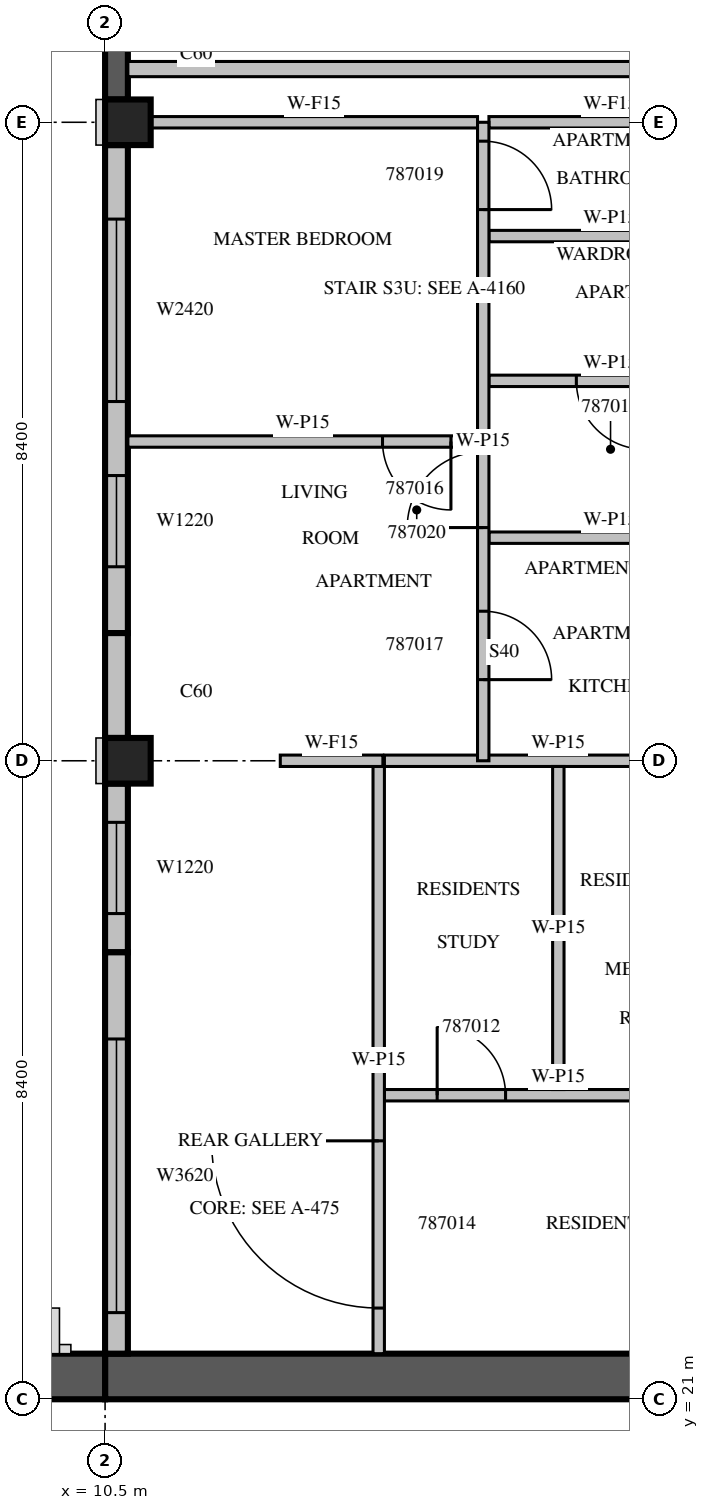
"""IFC4 building model, lengths in metres.
Left out: names, types, materials, properties, quantities, classifications, styles, units other than length and angle.
Written with IfcOpenShell. Run it as: python <this file> out.ifc"""

import sys

from ifc_helpers import new_model, si_unit, direction, frame, frame_2d, origin, origin_2d, place, context, subcontext, project, spatial, rectangle, extrude, source, transform, mapped, element, fill, save


model = new_model("IFC4")
c1 = context("Model", 3, precision=1e-05, world=origin(), true_north=direction((0.0, 1.0)))
c2 = subcontext(c1, "Body", "Model", "MODEL_VIEW")
j1 = project(units=[si_unit("LENGTHUNIT", "METRE"), si_unit("PLANEANGLEUNIT", "RADIAN")], contexts=[c1])
p1 = place(None, origin())
s1 = spatial("IfcSite", under=j1, at=p1, CompositionType="ELEMENT")
p2 = place(p1, origin())
s2 = spatial("IfcBuilding", under=s1, at=p2, CompositionType="ELEMENT")
p3 = place(p2, frame((0.0, 0.0, 365.0)))
s3 = spatial("IfcBuildingStorey", under=s2, at=p3, CompositionType="ELEMENT", Elevation=365.0)
m1 = source(origin(), c2, "Body", "SweptSolid", [
    extrude(rectangle(XDim=0.6, YDim=0.6, at=origin_2d()), origin(), (0.0, 0.0, 1.0), 3.5),
])
for number, where, z_axis, x_axis in (
    (1, (10.8, 29.4, 0.0), (0.0, 0.0, 1.0), (1.0, 0.0, 0.0)),
    (2, (10.8, 37.8, 0.0), (0.0, 0.0, 1.0), (1.0, 0.0, 0.0)),
):
    element("IfcColumn", number, at=place(p3, frame(where, z_axis=z_axis, x_axis=x_axis)), inside=s3, PredefinedType="COLUMN", context=c2, shape_type="MappedRepresentation", body=[
        mapped(m1, transform((0.0, 0.0, 0.0), scale=1.0)),
    ])
m2 = source(origin(), c2, "Body", "SweptSolid", [
    extrude(rectangle(XDim=11.1, YDim=0.6, at=frame_2d((5.55, 0.0))), origin(), (0.0, 0.0, 1.0), 3.5),
])
p4 = place(p3, frame((10.5, 21.3, 0.0), z_axis=(0.0, 0.0, 1.0), x_axis=(1.0, 0.0, 0.0)))
e3 = element("IfcWall", 3, at=p4, inside=s3, PredefinedType="SHEAR", context=c2, shape_type="MappedRepresentation", body=[
    mapped(m2, transform((0.0, 0.0, 0.0), scale=1.0)),
])
m3 = source(origin(), c2, "Body", "SweptSolid", [
    extrude(rectangle(XDim=1.2, YDim=2.1, at=frame_2d((0.6, 1.05))), frame((0.0, 0.31, 0.0), z_axis=(0.0, -1.0, 0.0), x_axis=(1.0, 0.0, 0.0)), (0.0, 0.0, 1.0), 0.62),
])
p5 = place(p4, frame((8.7, 0.0, 0.0)))
e4 = element("IfcOpeningElement", 4, at=p5, cuts=e3, PredefinedType="OPENING", context=c2, shape_type="MappedRepresentation", body=[
    mapped(m3, transform((0.0, 0.0, 0.0), scale=1.0)),
])
m4 = source(origin(), c2, "Body", "SweptSolid", [
    extrude(rectangle(XDim=6.6, YDim=0.6, at=frame_2d((3.3, 0.0))), origin(), (0.0, 0.0, 1.0), 3.5),
])
p6 = place(p3, frame((3.9, 21.3, 0.0), z_axis=(0.0, 0.0, 1.0), x_axis=(1.0, 0.0, 0.0)))
e5 = element("IfcWall", 5, at=p6, inside=s3, PredefinedType="SHEAR", context=c2, shape_type="MappedRepresentation", body=[
    mapped(m4, transform((0.0, 0.0, 0.0), scale=1.0)),
])
m5 = source(origin(), c2, "Body", "SweptSolid", [
    extrude(rectangle(XDim=1.2, YDim=2.4, at=frame_2d((0.6, 1.2))), frame((0.0, 0.31, 0.0), z_axis=(0.0, -1.0, 0.0), x_axis=(1.0, 0.0, 0.0)), (0.0, 0.0, 1.0), 0.62),
])
p7 = place(p6, frame((1.5, 0.0, 0.6)))
e6 = element("IfcOpeningElement", 6, at=p7, cuts=e5, PredefinedType="OPENING", context=c2, shape_type="MappedRepresentation", body=[
    mapped(m5, transform((0.0, 0.0, 0.0), scale=1.0)),
])
p8 = place(p6, frame((3.6, 0.0, 0.6)))
e7 = element("IfcOpeningElement", 7, at=p8, cuts=e5, PredefinedType="OPENING", context=c2, shape_type="MappedRepresentation", body=[
    mapped(m5, transform((0.0, 0.0, 0.0), scale=1.0)),
])
p9 = place(p3, frame((10.65, 43.68, 0.0), z_axis=(0.0, 0.0, 1.0), x_axis=(0.0, -1.0, 0.0)))
e8 = element("IfcWall", 8, at=p9, inside=s3, PredefinedType="SOLIDWALL", context=c2, shape_type="SweptSolid", body=[
    extrude(rectangle(XDim=5.58, YDim=0.3, at=frame_2d((2.79, 0.0))), origin(), (0.0, 0.0, 1.0), 3.05),
])
p10 = place(p3, frame((10.65, 37.5, 0.0), z_axis=(0.0, 0.0, 1.0), x_axis=(0.0, -1.0, 0.0)))
e9 = element("IfcWall", 9, at=p10, inside=s3, PredefinedType="STANDARD", context=c2, shape_type="SweptSolid", body=[
    extrude(rectangle(XDim=6.42, YDim=0.3, at=frame_2d((3.21, 0.0))), origin(), (0.0, 0.0, 1.0), 3.05),
])
m6 = source(origin(), c2, "Body", "SweptSolid", [
    extrude(rectangle(XDim=1.2, YDim=2.0, at=frame_2d((0.6, 1.0))), frame((0.0, 0.16, 0.0), z_axis=(0.0, -1.0, 0.0), x_axis=(1.0, 0.0, 0.0)), (0.0, 0.0, 1.0), 0.32),
])
p11 = place(p10, frame((4.348, 0.0, 0.6)))
e10 = element("IfcOpeningElement", 10, at=p11, cuts=e9, PredefinedType="OPENING", context=c2, shape_type="MappedRepresentation", body=[
    mapped(m6, transform((0.0, 0.0, 0.0), scale=1.0)),
])
m7 = source(origin(), c2, "Body", "SweptSolid", [
    extrude(rectangle(XDim=2.4, YDim=2.0, at=frame_2d((1.2, 1.0))), frame((0.0, 0.16, 0.0), z_axis=(0.0, -1.0, 0.0), x_axis=(1.0, 0.0, 0.0)), (0.0, 0.0, 1.0), 0.32),
])
p12 = place(p10, frame((0.974, 0.0, 0.6)))
e11 = element("IfcOpeningElement", 11, at=p12, cuts=e9, PredefinedType="OPENING", context=c2, shape_type="MappedRepresentation", body=[
    mapped(m7, transform((0.0, 0.0, 0.0), scale=1.0)),
])
p13 = place(p3, frame((10.65, 31.08, 0.0), z_axis=(0.0, 0.0, 1.0), x_axis=(0.0, -1.0, 0.0)))
e12 = element("IfcWall", 12, at=p13, inside=s3, PredefinedType="STANDARD", context=c2, shape_type="SweptSolid", body=[
    extrude(rectangle(XDim=1.38, YDim=0.3, at=frame_2d((0.69, 0.0))), origin(), (0.0, 0.0, 1.0), 3.05),
])
p14 = place(p3, frame((10.65, 29.1, 0.0), z_axis=(0.0, 0.0, 1.0), x_axis=(0.0, -1.0, 0.0)))
e13 = element("IfcWall", 13, at=p14, inside=s3, PredefinedType="STANDARD", context=c2, shape_type="SweptSolid", body=[
    extrude(rectangle(XDim=2.22, YDim=0.3, at=frame_2d((1.11, 0.0))), origin(), (0.0, 0.0, 1.0), 3.05),
])
p15 = place(p14, frame((0.51, 0.0, 0.6)))
e14 = element("IfcOpeningElement", 14, at=p15, cuts=e13, PredefinedType="OPENING", context=c2, shape_type="MappedRepresentation", body=[
    mapped(m6, transform((0.0, 0.0, 0.0), scale=1.0)),
])
p16 = place(p3, frame((10.65, 26.88, 0.0), z_axis=(0.0, 0.0, 1.0), x_axis=(0.0, -1.0, 0.0)))
e15 = element("IfcWall", 15, at=p16, inside=s3, PredefinedType="STANDARD", context=c2, shape_type="SweptSolid", body=[
    extrude(rectangle(XDim=5.28, YDim=0.3, at=frame_2d((2.64, 0.0))), origin(), (0.0, 0.0, 1.0), 3.05),
])
m8 = source(origin(), c2, "Body", "SweptSolid", [
    extrude(rectangle(XDim=3.6, YDim=2.0, at=frame_2d((1.8, 1.0))), frame((0.0, 0.16, 0.0), z_axis=(0.0, -1.0, 0.0), x_axis=(1.0, 0.0, 0.0)), (0.0, 0.0, 1.0), 0.32),
])
p17 = place(p16, frame((1.14, 0.0, 0.6)))
e16 = element("IfcOpeningElement", 16, at=p17, cuts=e15, PredefinedType="OPENING", context=c2, shape_type="MappedRepresentation", body=[
    mapped(m8, transform((0.0, 0.0, 0.0), scale=1.0)),
])
m9 = source(origin(), c2, "Body", "SweptSolid", [
    extrude(rectangle(XDim=8.0, YDim=0.2, at=frame_2d((4.0, 0.0))), origin(), (0.0, 0.0, 1.0), 3.05),
])
p18 = place(p3, frame((10.8, 38.5, 0.0), z_axis=(0.0, 0.0, 1.0), x_axis=(1.0, 0.0, 0.0)))
e17 = element("IfcWall", 17, at=p18, inside=s3, PredefinedType="PARTITIONING", context=c2, shape_type="MappedRepresentation", body=[
    mapped(m9, transform((0.0, 0.0, 0.0), scale=1.0)),
])
m10 = source(origin(), c2, "Body", "SweptSolid", [
    extrude(rectangle(XDim=4.575, YDim=0.15, at=frame_2d((2.288, 0.0))), origin(), (0.0, 0.0, 1.0), 3.05),
])
p19 = place(p3, frame((14.175, 25.0, 0.0), z_axis=(0.0, 0.0, 1.0), x_axis=(1.0, 0.0, 0.0)))
e18 = element("IfcWall", 18, at=p19, inside=s3, PredefinedType="PARTITIONING", context=c2, shape_type="MappedRepresentation", body=[
    mapped(m10, transform((0.0, 0.0, 0.0), scale=1.0)),
])
m11 = source(origin(), c2, "Body", "SweptSolid", [
    extrude(rectangle(XDim=0.9, YDim=2.1, at=frame_2d((0.45, 1.05))), frame((0.0, 0.085, 0.0), z_axis=(0.0, -1.0, 0.0), x_axis=(1.0, 0.0, 0.0)), (0.0, 0.0, 1.0), 0.17),
])
p20 = place(p19, frame((0.694, 0.0, 0.0)))
e19 = element("IfcOpeningElement", 19, at=p20, cuts=e18, PredefinedType="OPENING", context=c2, shape_type="MappedRepresentation", body=[
    mapped(m11, transform((0.0, 0.0, 0.0), scale=1.0)),
])
p21 = place(p3, frame((18.75, 29.4, 0.0), z_axis=(0.0, 0.0, 1.0), x_axis=(-1.0, 0.0, 0.0)))
e20 = element("IfcWall", 20, at=p21, inside=s3, PredefinedType="PARTITIONING", context=c2, shape_type="MappedRepresentation", body=[
    mapped(m10, transform((0.0, 0.0, 0.0), scale=1.0)),
])
m12 = source(origin(), c2, "Body", "SweptSolid", [
    extrude(rectangle(XDim=4.25, YDim=0.15, at=frame_2d((2.125, 0.0))), origin(), (0.0, 0.0, 1.0), 3.05),
])
p22 = place(p3, frame((16.463, 25.075, 0.0), z_axis=(0.0, 0.0, 1.0), x_axis=(0.0, 1.0, 0.0)))
e21 = element("IfcWall", 21, at=p22, inside=s3, PredefinedType="PARTITIONING", context=c2, shape_type="MappedRepresentation", body=[
    mapped(m12, transform((0.0, 0.0, 0.0), scale=1.0)),
])
m13 = source(origin(), c2, "Body", "SweptSolid", [
    extrude(rectangle(XDim=7.725, YDim=0.15, at=frame_2d((3.862, 0.0))), origin(), (0.0, 0.0, 1.0), 3.05),
])
p23 = place(p3, frame((14.1, 29.325, 0.0), z_axis=(0.0, 0.0, 1.0), x_axis=(0.0, -1.0, 0.0)))
e22 = element("IfcWall", 22, at=p23, inside=s3, PredefinedType="PARTITIONING", context=c2, shape_type="MappedRepresentation", body=[
    mapped(m13, transform((0.0, 0.0, 0.0), scale=1.0)),
])
m14 = source(origin(), c2, "Body", "SweptSolid", [
    extrude(rectangle(XDim=2.2, YDim=2.1, at=frame_2d((1.1, 1.05))), frame((0.0, 0.085, 0.0), z_axis=(0.0, -1.0, 0.0), x_axis=(1.0, 0.0, 0.0)), (0.0, 0.0, 1.0), 0.17),
])
p24 = place(p23, frame((4.925, 0.0, 0.0)))
e23 = element("IfcOpeningElement", 23, at=p24, cuts=e22, PredefinedType="OPENING", context=c2, shape_type="MappedRepresentation", body=[
    mapped(m14, transform((0.0, 0.0, 0.0), scale=1.0)),
])
p25 = place(p3, frame((15.4, 33.6, 0.0), z_axis=(0.0, 0.0, 1.0), x_axis=(-1.0, 0.0, 0.0)))
e24 = element("IfcWall", 24, at=p25, inside=s3, PredefinedType="PARTITIONING", context=c2, shape_type="SweptSolid", body=[
    extrude(rectangle(XDim=4.6, YDim=0.15, at=frame_2d((2.3, 0.0))), origin(), (0.0, 0.0, 1.0), 3.05),
])
p26 = place(p25, frame((0.35, 0.0, 0.0)))
e25 = element("IfcOpeningElement", 25, at=p26, cuts=e24, PredefinedType="OPENING", context=c2, shape_type="MappedRepresentation", body=[
    mapped(m11, transform((0.0, 0.0, 0.0), scale=1.0)),
])
m15 = source(origin(), c2, "Body", "SweptSolid", [
    extrude(rectangle(XDim=3.2, YDim=0.15, at=frame_2d((1.6, 0.0))), origin(), (0.0, 0.0, 1.0), 3.05),
])
p27 = place(p3, frame((18.75, 32.335, 0.0), z_axis=(0.0, 0.0, 1.0), x_axis=(-1.0, 0.0, 0.0)))
e26 = element("IfcWall", 26, at=p27, inside=s3, PredefinedType="PARTITIONING", context=c2, shape_type="MappedRepresentation", body=[
    mapped(m15, transform((0.0, 0.0, 0.0), scale=1.0)),
])
p28 = place(p3, frame((18.75, 34.398, 0.0), z_axis=(0.0, 0.0, 1.0), x_axis=(-1.0, 0.0, 0.0)))
e27 = element("IfcWall", 27, at=p28, inside=s3, PredefinedType="PARTITIONING", context=c2, shape_type="MappedRepresentation", body=[
    mapped(m15, transform((0.0, 0.0, 0.0), scale=1.0)),
])
p29 = place(p28, frame((1.15, 0.0, 0.0)))
e28 = element("IfcOpeningElement", 28, at=p29, cuts=e27, PredefinedType="OPENING", context=c2, shape_type="MappedRepresentation", body=[
    mapped(m11, transform((0.0, 0.0, 0.0), scale=1.0)),
])
p30 = place(p3, frame((18.75, 36.303, 0.0), z_axis=(0.0, 0.0, 1.0), x_axis=(-1.0, 0.0, 0.0)))
e29 = element("IfcWall", 29, at=p30, inside=s3, PredefinedType="PARTITIONING", context=c2, shape_type="MappedRepresentation", body=[
    mapped(m15, transform((0.0, 0.0, 0.0), scale=1.0)),
])
p31 = place(p3, frame((14.155, 29.4, 0.0), z_axis=(0.0, 0.0, 1.0), x_axis=(-1.0, 0.0, 0.0)))
e30 = element("IfcWall", 30, at=p31, inside=s3, PredefinedType="PARTITIONING", context=c2, shape_type="SweptSolid", body=[
    extrude(rectangle(XDim=1.35, YDim=0.15, at=frame_2d((0.675, 0.0))), origin(), (0.0, 0.0, 1.0), 3.05),
])
m16 = source(origin(), c2, "Body", "SweptSolid", [
    extrude(rectangle(XDim=4.301, YDim=0.15, at=frame_2d((2.151, 0.0))), origin(), (0.0, 0.0, 1.0), 3.05),
])
p32 = place(p3, frame((15.4, 37.8, 0.0), z_axis=(0.0, 0.0, 1.0), x_axis=(-1.0, 0.0, 0.0)))
e31 = element("IfcWall", 31, at=p32, inside=s3, PredefinedType="PARTITIONING", context=c2, shape_type="MappedRepresentation", body=[
    mapped(m16, transform((0.0, 0.0, 0.0), scale=1.0)),
])
p33 = place(p3, frame((18.75, 37.8, 0.0), z_axis=(0.0, 0.0, 1.0), x_axis=(-1.0, 0.0, 0.0)))
e32 = element("IfcWall", 32, at=p33, inside=s3, PredefinedType="PARTITIONING", context=c2, shape_type="MappedRepresentation", body=[
    mapped(m15, transform((0.0, 0.0, 0.0), scale=1.0)),
])
m17 = source(origin(), c2, "Body", "SweptSolid", [
    extrude(rectangle(XDim=8.4, YDim=0.15, at=frame_2d((4.2, 0.0))), origin(), (0.0, 0.0, 1.0), 3.05),
])
p34 = place(p3, frame((15.475, 29.4, 0.0), z_axis=(0.0, 0.0, 1.0), x_axis=(0.0, 1.0, 0.0)))
e33 = element("IfcWall", 33, at=p34, inside=s3, PredefinedType="PARTITIONING", context=c2, shape_type="MappedRepresentation", body=[
    mapped(m17, transform((0.0, 0.0, 0.0), scale=1.0)),
])
m18 = source(origin(), c2, "Body", "SweptSolid", [
    extrude(rectangle(XDim=1.0, YDim=2.1, at=frame_2d((0.5, 1.05))), frame((0.0, 0.085, 0.0), z_axis=(0.0, -1.0, 0.0), x_axis=(1.0, 0.0, 0.0)), (0.0, 0.0, 1.0), 0.17),
])
p35 = place(p34, frame((3.068, 0.0, 0.0)))
e34 = element("IfcOpeningElement", 34, at=p35, cuts=e33, PredefinedType="OPENING", context=c2, shape_type="MappedRepresentation", body=[
    mapped(m18, transform((0.0, 0.0, 0.0), scale=1.0)),
])
p36 = place(p34, frame((1.067, 0.0, 0.0)))
e35 = element("IfcOpeningElement", 35, at=p36, cuts=e33, PredefinedType="OPENING", context=c2, shape_type="MappedRepresentation", body=[
    mapped(m11, transform((0.0, 0.0, 0.0), scale=1.0)),
])
p37 = place(p34, frame((7.252, 0.0, 0.0)))
e36 = element("IfcOpeningElement", 36, at=p37, cuts=e33, PredefinedType="OPENING", context=c2, shape_type="MappedRepresentation", body=[
    mapped(m11, transform((0.0, 0.0, 0.0), scale=1.0)),
])
m19 = source(origin(), c2, "Body", "SweptSolid", [
    extrude(rectangle(XDim=1.2, YDim=2.0, at=frame_2d((0.6, 1.0))), frame((0.0, 0.03, 0.0), z_axis=(0.0, -1.0, 0.0), x_axis=(1.0, 0.0, 0.0)), (0.0, 0.0, 1.0), 0.06),
])
p38 = place(p11, origin())
e37 = element("IfcWindow", 37, at=p38, inside=s3, PartitioningType="SINGLE_PANEL", PredefinedType="WINDOW", context=c2, shape_type="MappedRepresentation", body=[
    mapped(m19, transform((0.0, 0.0, 0.0), scale=1.0)),
])
fill(e10, e37)
m20 = source(origin(), c2, "Body", "SweptSolid", [
    extrude(rectangle(XDim=2.4, YDim=2.0, at=frame_2d((1.2, 1.0))), frame((0.0, 0.03, 0.0), z_axis=(0.0, -1.0, 0.0), x_axis=(1.0, 0.0, 0.0)), (0.0, 0.0, 1.0), 0.06),
])
p39 = place(p12, origin())
e38 = element("IfcWindow", 38, at=p39, inside=s3, PartitioningType="SINGLE_PANEL", PredefinedType="WINDOW", context=c2, shape_type="MappedRepresentation", body=[
    mapped(m20, transform((0.0, 0.0, 0.0), scale=1.0)),
])
fill(e11, e38)
p40 = place(p15, origin())
e39 = element("IfcWindow", 39, at=p40, inside=s3, PartitioningType="SINGLE_PANEL", PredefinedType="WINDOW", context=c2, shape_type="MappedRepresentation", body=[
    mapped(m19, transform((0.0, 0.0, 0.0), scale=1.0)),
])
fill(e14, e39)
m21 = source(origin(), c2, "Body", "SweptSolid", [
    extrude(rectangle(XDim=3.6, YDim=2.0, at=frame_2d((1.8, 1.0))), frame((0.0, 0.03, 0.0), z_axis=(0.0, -1.0, 0.0), x_axis=(1.0, 0.0, 0.0)), (0.0, 0.0, 1.0), 0.06),
])
p41 = place(p17, origin())
e40 = element("IfcWindow", 40, at=p41, inside=s3, PartitioningType="SINGLE_PANEL", PredefinedType="WINDOW", context=c2, shape_type="MappedRepresentation", body=[
    mapped(m21, transform((0.0, 0.0, 0.0), scale=1.0)),
])
fill(e16, e40)
m22 = source(origin(), c2, "Body", "SweptSolid", [
    extrude(rectangle(XDim=0.9, YDim=2.1, at=frame_2d((0.45, 1.05))), frame((0.0, 0.025, 0.0), z_axis=(0.0, -1.0, 0.0), x_axis=(1.0, 0.0, 0.0)), (0.0, 0.0, 1.0), 0.05),
])
p42 = place(p20, origin())
e41 = element("IfcDoor", 41, at=p42, inside=s3, OperationType="SINGLE_SWING_LEFT", PredefinedType="DOOR", context=c2, shape_type="MappedRepresentation", body=[
    mapped(m22, transform((0.0, 0.0, 0.0), scale=1.0)),
])
fill(e19, e41)
m23 = source(origin(), c2, "Body", "SweptSolid", [
    extrude(rectangle(XDim=2.2, YDim=2.1, at=frame_2d((1.1, 1.05))), frame((0.0, 0.025, 0.0), z_axis=(0.0, -1.0, 0.0), x_axis=(1.0, 0.0, 0.0)), (0.0, 0.0, 1.0), 0.05),
])
p43 = place(p24, origin())
e42 = element("IfcDoor", 42, at=p43, inside=s3, OperationType="DOUBLE_DOOR_SINGLE_SWING", PredefinedType="DOOR", context=c2, shape_type="MappedRepresentation", body=[
    mapped(m23, transform((0.0, 0.0, 0.0), scale=1.0)),
])
fill(e23, e42)
m24 = source(origin(), c2, "Body", "SweptSolid", [
    extrude(rectangle(XDim=1.0, YDim=2.1, at=frame_2d((0.5, 1.05))), frame((0.0, 0.025, 0.0), z_axis=(0.0, -1.0, 0.0), x_axis=(1.0, 0.0, 0.0)), (0.0, 0.0, 1.0), 0.05),
])
p44 = place(p35, origin())
e43 = element("IfcDoor", 43, at=p44, inside=s3, OperationType="SINGLE_SWING_LEFT", PredefinedType="DOOR", context=c2, shape_type="MappedRepresentation", body=[
    mapped(m24, transform((0.0, 0.0, 0.0), scale=1.0)),
])
fill(e34, e43)
p45 = place(p36, origin())
e44 = element("IfcDoor", 44, at=p45, inside=s3, OperationType="SINGLE_SWING_RIGHT", PredefinedType="DOOR", context=c2, shape_type="MappedRepresentation", body=[
    mapped(m22, transform((0.0, 0.0, 0.0), scale=1.0)),
])
fill(e35, e44)
p46 = place(p29, origin())
e45 = element("IfcDoor", 45, at=p46, inside=s3, OperationType="SINGLE_SWING_LEFT", PredefinedType="DOOR", context=c2, shape_type="MappedRepresentation", body=[
    mapped(m22, transform((0.0, 0.0, 0.0), scale=1.0)),
])
fill(e28, e45)
p47 = place(p37, origin())
e46 = element("IfcDoor", 46, at=p47, inside=s3, OperationType="SINGLE_SWING_RIGHT", PredefinedType="DOOR", context=c2, shape_type="MappedRepresentation", body=[
    mapped(m22, transform((0.0, 0.0, 0.0), scale=1.0)),
])
fill(e36, e46)
p48 = place(p26, origin())
e47 = element("IfcDoor", 47, at=p48, inside=s3, OperationType="SINGLE_SWING_LEFT", PredefinedType="DOOR", context=c2, shape_type="MappedRepresentation", body=[
    mapped(m22, transform((0.0, 0.0, 0.0), scale=1.0)),
])
fill(e25, e47)
save(model, sys.argv[1])
